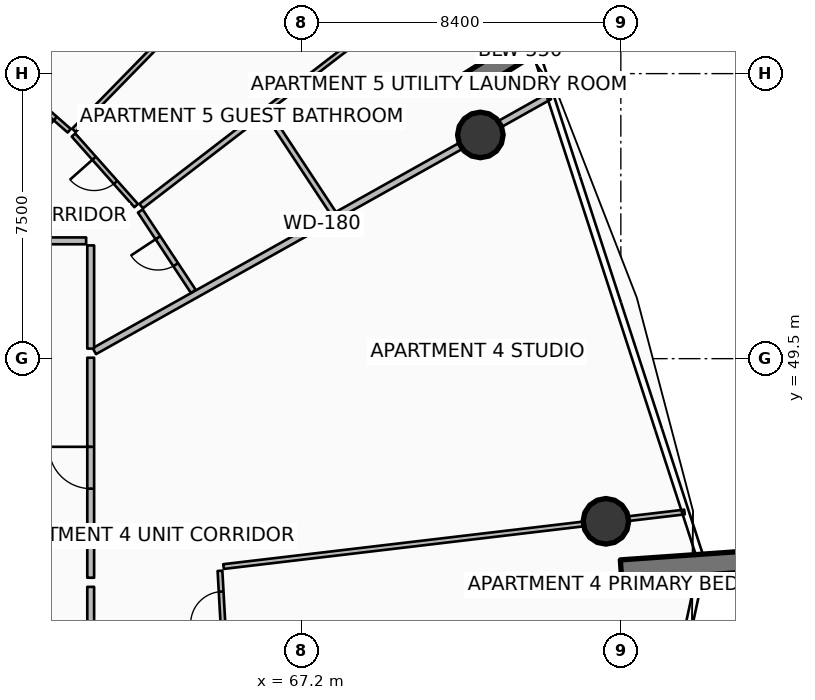
"""IFC4 building model, lengths in metres.
Left out: names, types, materials, properties, quantities, classifications, styles, units other than length and angle.
Written with IfcOpenShell. Run it as: python <this file> out.ifc"""

import sys

from ifc_helpers import new_model, si_unit, direction, frame, frame_2d, origin, origin_2d, place, context, subcontext, project, spatial, rectangle, circle, extrude, element, fill, save


model = new_model("IFC4")
c1 = context("Model", 3, precision=1e-05, world=origin(), true_north=direction((0.0, 1.0)))
c2 = subcontext(c1, "Body", "Model", "MODEL_VIEW")
j1 = project(units=[si_unit("LENGTHUNIT", "METRE"), si_unit("PLANEANGLEUNIT", "RADIAN")], contexts=[c1])
p1 = place(None, origin())
s1 = spatial("IfcSite", under=j1, at=p1, CompositionType="ELEMENT")
p2 = place(p1, origin())
s2 = spatial("IfcBuilding", under=s1, at=p2, CompositionType="ELEMENT")
p3 = place(p2, frame((0.0, 0.0, 78.9)))
s3 = spatial("IfcBuildingStorey", under=s2, at=p3, CompositionType="ELEMENT", Elevation=78.9)
for number, where, z_axis, x_axis in (
    (1, (71.469, 56.665, 0.0), (0.0, 0.0, 1.0), (0.848, 0.53, 0.0)),
    (2, (75.606, 43.93, 0.0), (0.0, 0.0, 1.0), (0.998, 0.07, 0.0)),
):
    element("IfcWall", number, at=place(p3, frame(where, z_axis=z_axis, x_axis=x_axis)), inside=s3, PredefinedType="SOLIDWALL", context=c2, shape_type="SweptSolid", body=[
        extrude(rectangle(XDim=3.5, YDim=0.55, at=frame_2d((1.75, 0.0))), origin(), (0.0, 0.0, 1.0), 3.75),
    ])
for number, where, z_axis, x_axis in (
    (3, (71.903, 55.386, 0.0), (0.0, 0.0, 1.0), (1.0, 0.0, 0.0)),
    (4, (75.207, 45.22, 0.0), (0.0, 0.0, 1.0), (1.0, 0.0, 0.0)),
):
    element("IfcColumn", number, at=place(p3, frame(where, z_axis=z_axis, x_axis=x_axis)), inside=s3, PredefinedType="COLUMN", context=c2, shape_type="SweptSolid", body=[
        extrude(circle(Radius=0.6, at=origin_2d()), origin(), (0.0, 0.0, 1.0), 3.5),
    ])
p4 = place(p3, frame((61.746, 49.698, 0.0), z_axis=(0.0, 0.0, 1.0), x_axis=(0.872489938668, 0.488632077256, 0.0)))
e5 = element("IfcWall", 5, at=p4, inside=s3, PredefinedType="PARTITIONING", context=c2, shape_type="SweptSolid", body=[
    extrude(rectangle(XDim=13.725, YDim=0.18, at=frame_2d((6.862, 0.0))), origin(), (0.0, 0.0, 1.0), 2.94),
])
p5 = place(p3, frame((61.65, 43.736, 0.0), z_axis=(0.0, 0.0, 1.0), x_axis=(0.0, 1.0, 0.0)))
e6 = element("IfcWall", 6, at=p5, inside=s3, PredefinedType="PARTITIONING", context=c2, shape_type="SweptSolid", body=[
    extrude(rectangle(XDim=5.789, YDim=0.18, at=frame_2d((2.895, 0.0))), origin(), (0.0, 0.0, 1.0), 2.94),
])
p6 = place(p5, frame((2.344, 0.0, 0.0)))
e7 = element("IfcOpeningElement", 7, at=p6, cuts=e6, PredefinedType="OPENING", context=c2, shape_type="SweptSolid", body=[
    extrude(rectangle(XDim=1.1, YDim=2.1, at=frame_2d((0.55, 1.05))), frame((0.0, 0.1, 0.0), z_axis=(0.0, -1.0, 0.0), x_axis=(1.0, 0.0, 0.0)), (0.0, 0.0, 1.0), 0.2),
])
p7 = place(p3, frame((61.65, 38.27, 0.0), z_axis=(0.0, 0.0, 1.0), x_axis=(0.0, 1.0, 0.0)))
e8 = element("IfcWall", 8, at=p7, inside=s3, PredefinedType="PARTITIONING", context=c2, shape_type="SweptSolid", body=[
    extrude(rectangle(XDim=5.225, YDim=0.18, at=frame_2d((2.613, 0.0))), origin(), (0.0, 0.0, 1.0), 2.94),
])
p8 = place(p3, frame((65.145, 44.029, 0.0), z_axis=(0.0, 0.0, 1.0), x_axis=(0.993069321468, 0.117530092994, 0.0)))
e9 = element("IfcWall", 9, at=p8, inside=s3, PredefinedType="PARTITIONING", context=c2, shape_type="SweptSolid", body=[
    extrude(rectangle(XDim=12.214, YDim=0.125, at=frame_2d((6.107, 0.0))), origin(), (0.0, 0.0, 1.0), 2.94),
])
p9 = place(p3, frame((65.16, 41.975, 0.0), z_axis=(0.0, 0.0, 1.0), x_axis=(-0.055845342743, 0.998439431159, 0.0)))
e10 = element("IfcWall", 10, at=p9, inside=s3, PredefinedType="PARTITIONING", context=c2, shape_type="SweptSolid", body=[
    extrude(rectangle(XDim=1.945, YDim=0.125, at=frame_2d((0.973, 0.0))), origin(), (0.0, 0.0, 1.0), 2.94),
])
p10 = place(p9, frame((0.548, 0.0, 0.0)))
e11 = element("IfcOpeningElement", 11, at=p10, cuts=e10, PredefinedType="OPENING", context=c2, shape_type="SweptSolid", body=[
    extrude(rectangle(XDim=0.85, YDim=2.06, at=frame_2d((0.425, 1.03))), frame((0.0, 0.073, 0.0), z_axis=(0.0, -1.0, 0.0), x_axis=(1.0, 0.0, 0.0)), (0.0, 0.0, 1.0), 0.145),
])
p11 = place(p3, frame((61.65, 49.764, 0.0), z_axis=(0.0, 0.0, 1.0), x_axis=(0.0, 1.0, 0.0)))
e12 = element("IfcWall", 12, at=p11, inside=s3, PredefinedType="PARTITIONING", context=c2, shape_type="SweptSolid", body=[
    extrude(rectangle(XDim=2.716, YDim=0.18, at=frame_2d((1.358, 0.0))), origin(), (0.0, 0.0, 1.0), 2.94),
])
p12 = place(p3, frame((61.53, 52.6, 0.0), z_axis=(0.0, 0.0, 1.0), x_axis=(-1.0, 0.0, 0.0)))
e13 = element("IfcWall", 13, at=p12, inside=s3, PredefinedType="PARTITIONING", context=c2, shape_type="SweptSolid", body=[
    extrude(rectangle(XDim=5.054, YDim=0.18, at=frame_2d((2.527, 0.0))), origin(), (0.0, 0.0, 1.0), 2.94),
])
p13 = place(p3, frame((59.702, 56.844, 0.0), z_axis=(0.0, 0.0, 1.0), x_axis=(0.619083405129, 0.785325243128, 0.0)))
e14 = element("IfcWall", 14, at=p13, inside=s3, PredefinedType="PARTITIONING", context=c2, shape_type="SweptSolid", body=[
    extrude(rectangle(XDim=9.769, YDim=0.125, at=frame_2d((4.885, 0.0))), origin(), (0.0, 0.0, 1.0), 2.94),
])
p14 = place(p3, frame((64.35, 51.271, 0.0), z_axis=(0.0, 0.0, 1.0), x_axis=(-0.550510405652, 0.83482830167, 0.0)))
e15 = element("IfcWall", 15, at=p14, inside=s3, PredefinedType="PARTITIONING", context=c2, shape_type="SweptSolid", body=[
    extrude(rectangle(XDim=2.532, YDim=0.15, at=frame_2d((1.266, 0.0))), origin(), (0.0, 0.0, 1.0), 2.94),
])
p15 = place(p14, frame((0.841, 0.0, 0.0)))
e16 = element("IfcOpeningElement", 16, at=p15, cuts=e15, PredefinedType="OPENING", context=c2, shape_type="SweptSolid", body=[
    extrude(rectangle(XDim=0.85, YDim=2.06, at=frame_2d((0.425, 1.03))), frame((0.0, 0.085, 0.0), z_axis=(0.0, -1.0, 0.0), x_axis=(1.0, 0.0, 0.0)), (0.0, 0.0, 1.0), 0.17),
])
p16 = place(p3, frame((68.031, 53.333, 0.0), z_axis=(0.0, 0.0, 1.0), x_axis=(-0.550480727927, 0.83484787128, 0.0)))
e17 = element("IfcWall", 17, at=p16, inside=s3, PredefinedType="PARTITIONING", context=c2, shape_type="SweptSolid", body=[
    extrude(rectangle(XDim=3.143, YDim=0.15, at=frame_2d((1.572, 0.0))), origin(), (0.0, 0.0, 1.0), 2.94),
])
p17 = place(p3, frame((62.978, 53.514, 0.0), z_axis=(0.0, 0.0, 1.0), x_axis=(0.792801485355, 0.609479946199, 0.0)))
e18 = element("IfcWall", 18, at=p17, inside=s3, PredefinedType="PARTITIONING", context=c2, shape_type="SweptSolid", body=[
    extrude(rectangle(XDim=4.09, YDim=0.15, at=frame_2d((2.045, 0.0))), origin(), (0.0, 0.0, 1.0), 2.94),
])
p18 = place(p3, frame((66.323, 56.086, 0.0), z_axis=(0.0, 0.0, 1.0), x_axis=(0.792792040596, 0.60949223159, 0.0)))
e19 = element("IfcWall", 19, at=p18, inside=s3, PredefinedType="PARTITIONING", context=c2, shape_type="SweptSolid", body=[
    extrude(rectangle(XDim=5.994, YDim=0.125, at=frame_2d((2.997, 0.0))), origin(), (0.0, 0.0, 1.0), 2.94),
])
p19 = place(p18, frame((2.572, 0.0, 0.0)))
e20 = element("IfcOpeningElement", 20, at=p19, cuts=e19, PredefinedType="OPENING", context=c2, shape_type="SweptSolid", body=[
    extrude(rectangle(XDim=0.85, YDim=2.06, at=frame_2d((0.425, 1.03))), frame((0.0, 0.073, 0.0), z_axis=(0.0, -1.0, 0.0), x_axis=(1.0, 0.0, 0.0)), (0.0, 0.0, 1.0), 0.145),
])
p20 = place(p3, frame((61.208, 55.508, 0.0), z_axis=(0.0, 0.0, 1.0), x_axis=(0.699096858951, 0.715026979774, 0.0)))
e21 = element("IfcWall", 21, at=p20, inside=s3, PredefinedType="PARTITIONING", context=c2, shape_type="SweptSolid", body=[
    extrude(rectangle(XDim=9.747, YDim=0.125, at=frame_2d((4.874, 0.0))), origin(), (0.0, 0.0, 1.0), 2.94),
])
p21 = place(p3, frame((62.846, 53.527, 0.0), z_axis=(0.0, 0.0, 1.0), x_axis=(-0.663881646848, 0.747837655497, 0.0)))
e22 = element("IfcWall", 22, at=p21, inside=s3, PredefinedType="PARTITIONING", context=c2, shape_type="SweptSolid", body=[
    extrude(rectangle(XDim=2.483, YDim=0.125, at=frame_2d((1.242, 0.0))), origin(), (0.0, 0.0, 1.0), 2.94),
])
p22 = place(p21, frame((0.817, 0.0, 0.0)))
e23 = element("IfcOpeningElement", 23, at=p22, cuts=e22, PredefinedType="OPENING", context=c2, shape_type="SweptSolid", body=[
    extrude(rectangle(XDim=0.85, YDim=2.06, at=frame_2d((0.425, 1.03))), frame((0.0, 0.073, 0.0), z_axis=(0.0, -1.0, 0.0), x_axis=(1.0, 0.0, 0.0)), (0.0, 0.0, 1.0), 0.145),
])
p23 = place(p3, frame((61.084, 55.497, 0.0), z_axis=(0.0, 0.0, 1.0), x_axis=(-0.75124742024, 0.660020691784, 0.0)))
e24 = element("IfcWall", 24, at=p23, inside=s3, PredefinedType="PARTITIONING", context=c2, shape_type="SweptSolid", body=[
    extrude(rectangle(XDim=1.823, YDim=0.125, at=frame_2d((0.911, 0.0))), origin(), (0.0, 0.0, 1.0), 2.94),
])
p24 = place(p23, frame((0.486, 0.0, 0.0)))
e25 = element("IfcOpeningElement", 25, at=p24, cuts=e24, PredefinedType="OPENING", context=c2, shape_type="SweptSolid", body=[
    extrude(rectangle(XDim=0.85, YDim=2.06, at=frame_2d((0.425, 1.03))), frame((0.0, 0.073, 0.0), z_axis=(0.0, -1.0, 0.0), x_axis=(1.0, 0.0, 0.0)), (0.0, 0.0, 1.0), 0.145),
])
p25 = place(p6, origin())
e26 = element("IfcDoor", 26, at=p25, inside=s3, OperationType="SINGLE_SWING_RIGHT", PredefinedType="DOOR", context=c2, shape_type="SweptSolid", body=[
    extrude(rectangle(XDim=1.1, YDim=2.1, at=frame_2d((0.55, 1.05))), frame((0.0, 0.025, 0.0), z_axis=(0.0, -1.0, 0.0), x_axis=(1.0, 0.0, 0.0)), (0.0, 0.0, 1.0), 0.05),
])
fill(e7, e26)
p26 = place(p10, origin())
e27 = element("IfcDoor", 27, at=p26, inside=s3, OperationType="SINGLE_SWING_LEFT", PredefinedType="DOOR", context=c2, shape_type="SweptSolid", body=[
    extrude(rectangle(XDim=0.85, YDim=2.06, at=frame_2d((0.425, 1.03))), frame((0.0, 0.025, 0.0), z_axis=(0.0, -1.0, 0.0), x_axis=(1.0, 0.0, 0.0)), (0.0, 0.0, 1.0), 0.05),
])
fill(e11, e27)
p27 = place(p15, origin())
e28 = element("IfcDoor", 28, at=p27, inside=s3, OperationType="SINGLE_SWING_RIGHT", PredefinedType="DOOR", context=c2, shape_type="SweptSolid", body=[
    extrude(rectangle(XDim=0.85, YDim=2.06, at=frame_2d((0.425, 1.03))), frame((0.0, 0.025, 0.0), z_axis=(0.0, -1.0, 0.0), x_axis=(1.0, 0.0, 0.0)), (0.0, 0.0, 1.0), 0.05),
])
fill(e16, e28)
p28 = place(p22, origin())
e29 = element("IfcDoor", 29, at=p28, inside=s3, OperationType="SINGLE_SWING_RIGHT", PredefinedType="DOOR", context=c2, shape_type="SweptSolid", body=[
    extrude(rectangle(XDim=0.85, YDim=2.06, at=frame_2d((0.425, 1.03))), frame((0.0, 0.025, 0.0), z_axis=(0.0, -1.0, 0.0), x_axis=(1.0, 0.0, 0.0)), (0.0, 0.0, 1.0), 0.05),
])
fill(e23, e29)
p29 = place(p24, origin())
e30 = element("IfcDoor", 30, at=p29, inside=s3, OperationType="SINGLE_SWING_LEFT", PredefinedType="DOOR", context=c2, shape_type="SweptSolid", body=[
    extrude(rectangle(XDim=0.85, YDim=2.06, at=frame_2d((0.425, 1.03))), frame((0.0, 0.025, 0.0), z_axis=(0.0, -1.0, 0.0), x_axis=(1.0, 0.0, 0.0)), (0.0, 0.0, 1.0), 0.05),
])
fill(e25, e30)
save(model, sys.argv[1])
